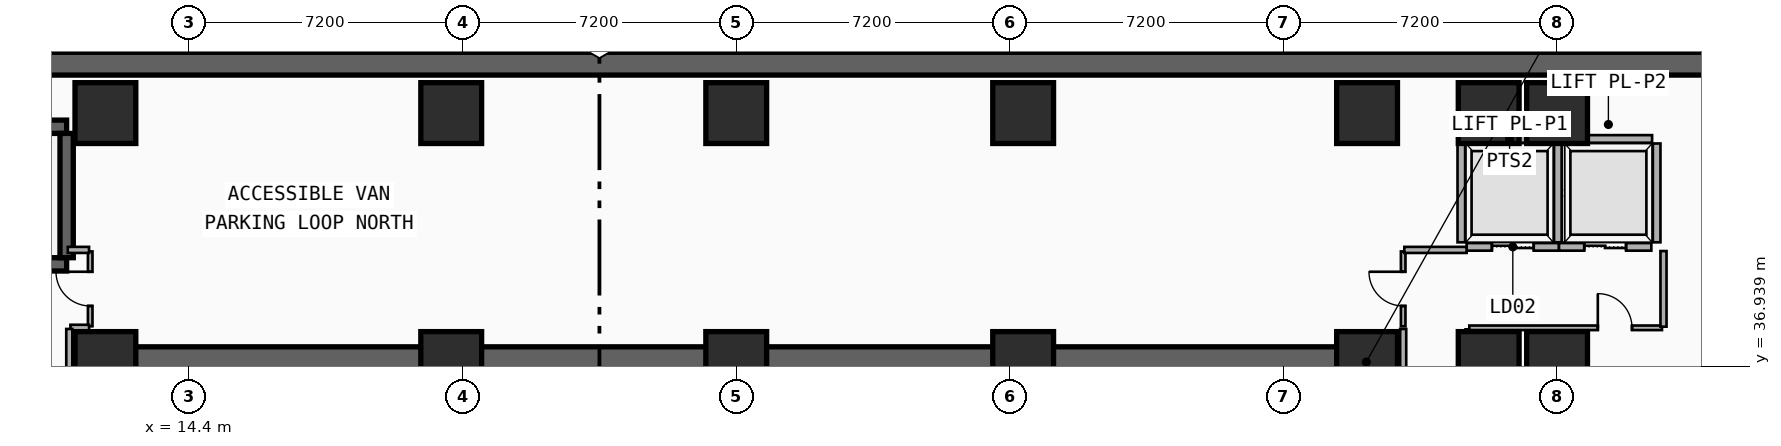
"""IFC4 building model, lengths in metres.
Left out: names, types, materials, properties, quantities, classifications, styles, units other than length and angle.
Written with IfcOpenShell. Run it as: python <this file> out.ifc"""

import sys

from ifc_helpers import new_model, si_unit, direction, frame, frame_2d, origin, origin_2d, place, context, subcontext, project, spatial, rectangle, extrude, element, fill, save


model = new_model("IFC4")
c1 = context("Model", 3, precision=1e-05, world=origin(), true_north=direction((0.0, 1.0)))
c2 = subcontext(c1, "Body", "Model", "MODEL_VIEW")
j1 = project(units=[si_unit("LENGTHUNIT", "METRE"), si_unit("PLANEANGLEUNIT", "RADIAN")], contexts=[c1])
p1 = place(None, origin())
s1 = spatial("IfcSite", under=j1, at=p1, CompositionType="ELEMENT")
p2 = place(p1, origin())
s2 = spatial("IfcBuilding", under=s1, at=p2, CompositionType="ELEMENT")
p3 = place(p2, frame((0.0, 0.0, -8.8)))
s3 = spatial("IfcBuildingStorey", under=s2, at=p3, CompositionType="ELEMENT", Elevation=-8.8)
p4 = place(p3, frame((0.3, 44.9, 0.0), z_axis=(0.0, 0.0, 1.0), x_axis=(1.0, 0.0, 0.0)))
e1 = element("IfcWall", 1, at=p4, inside=s3, PredefinedType="USERDEFINED", context=c2, shape_type="SweptSolid", body=[
    extrude(rectangle(XDim=57.0, YDim=0.6, at=frame_2d((28.5, 0.0))), origin(), (0.0, 0.0, 1.0), 4.4),
])
p5 = place(p3, frame((12.15, 37.05, 0.0), z_axis=(0.0, 0.0, 1.0), x_axis=(1.0, 0.0, 0.0)))
e2 = element("IfcWall", 2, at=p5, inside=s3, PredefinedType="SHEAR", context=c2, shape_type="SweptSolid", body=[
    extrude(rectangle(XDim=33.23, YDim=0.8, at=frame_2d((16.615, 0.0))), origin(), (0.0, 0.0, 1.0), 4.4),
])
p6 = place(p3, frame((1.62, 43.24, 0.0), z_axis=(0.0, 0.0, 1.0), x_axis=(1.0, 0.0, 0.0)))
e3 = element("IfcWall", 3, at=p6, inside=s3, PredefinedType="SHEAR", context=c2, shape_type="SweptSolid", body=[
    extrude(rectangle(XDim=9.56, YDim=0.35, at=frame_2d((4.78, 0.0))), origin(), (0.0, 0.0, 1.0), 4.4),
])
p7 = place(p3, frame((11.18, 39.62, 0.0), z_axis=(0.0, 0.0, 1.0), x_axis=(-1.0, 0.0, 0.0)))
e4 = element("IfcWall", 4, at=p7, inside=s3, PredefinedType="SHEAR", context=c2, shape_type="SweptSolid", body=[
    extrude(rectangle(XDim=9.56, YDim=0.35, at=frame_2d((4.78, 0.0))), origin(), (0.0, 0.0, 1.0), 4.4),
])
p8 = place(p7, frame((8.03, 0.0, 0.0)))
e5 = element("IfcOpeningElement", 5, at=p8, cuts=e4, PredefinedType="OPENING", context=c2, shape_type="SweptSolid", body=[
    extrude(rectangle(XDim=1.1, YDim=2.15, at=frame_2d((0.55, 1.075))), frame((0.0, 0.185, 0.0), z_axis=(0.0, -1.0, 0.0), x_axis=(1.0, 0.0, 0.0)), (0.0, 0.0, 1.0), 0.37),
])
p9 = place(p3, frame((11.18, 39.795, 0.0), z_axis=(0.0, 0.0, 1.0), x_axis=(0.0, 1.0, 0.0)))
e6 = element("IfcWall", 6, at=p9, inside=s3, PredefinedType="SHEAR", context=c2, shape_type="SweptSolid", body=[
    extrude(rectangle(XDim=3.27, YDim=0.35, at=frame_2d((1.635, 0.0))), origin(), (0.0, 0.0, 1.0), 4.4),
])
for number, where, z_axis, x_axis in (
    (7, (12.2, 37.05, 0.0), (0.0, 0.0, 1.0), (1.0, 0.0, 0.0)),
    (8, (21.3, 37.05, 0.0), (0.0, 0.0, 1.0), (1.0, 0.0, 0.0)),
    (9, (28.8, 37.05, 0.0), (0.0, 0.0, 1.0), (1.0, 0.0, 0.0)),
    (10, (36.35, 37.05, 0.0), (0.0, 0.0, 1.0), (1.0, 0.0, 0.0)),
    (11, (45.4, 37.05, 0.0), (0.0, 0.0, 1.0), (1.0, 0.0, 0.0)),
    (12, (12.2, 43.6, 0.0), (0.0, 0.0, 1.0), (1.0, 0.0, 0.0)),
    (13, (21.3, 43.6, 0.0), (0.0, 0.0, 1.0), (1.0, 0.0, 0.0)),
    (14, (28.8, 43.6, 0.0), (0.0, 0.0, 1.0), (1.0, 0.0, 0.0)),
    (15, (36.35, 43.6, 0.0), (0.0, 0.0, 1.0), (1.0, 0.0, 0.0)),
    (16, (45.4, 43.6, 0.0), (0.0, 0.0, 1.0), (1.0, 0.0, 0.0)),
    (17, (48.6, 37.05, 0.0), (0.0, 0.0, 1.0), (1.0, 0.0, 0.0)),
    (18, (48.6, 43.6, 0.0), (0.0, 0.0, 1.0), (1.0, 0.0, 0.0)),
    (19, (50.4, 37.05, 0.0), (0.0, 0.0, 1.0), (1.0, 0.0, 0.0)),
    (20, (50.4, 43.6, 0.0), (0.0, 0.0, 1.0), (1.0, 0.0, 0.0)),
):
    element("IfcColumn", number, at=place(p3, frame(where, z_axis=z_axis, x_axis=x_axis)), inside=s3, PredefinedType="COLUMN", context=c2, shape_type="SweptSolid", body=[
        extrude(rectangle(XDim=1.6, YDim=1.6, at=origin_2d()), origin(), (0.0, 0.0, 1.0), 4.4),
    ])
p10 = place(p3, frame((48.02, 40.08, 0.0), z_axis=(0.0, 0.0, 1.0), x_axis=(1.0, 0.0, 0.0)))
e21 = element("IfcWall", 21, at=p10, inside=s3, PredefinedType="PARTITIONING", context=c2, shape_type="SweptSolid", body=[
    extrude(rectangle(XDim=2.43, YDim=0.2, at=frame_2d((1.215, 0.0))), origin(), (0.0, 0.0, 1.0), 4.08),
])
p11 = place(p10, frame((0.665, 0.0, 0.0)))
e22 = element("IfcOpeningElement", 22, at=p11, cuts=e21, PredefinedType="OPENING", context=c2, shape_type="SweptSolid", body=[
    extrude(rectangle(XDim=1.1, YDim=2.15, at=frame_2d((0.55, 1.075))), frame((0.0, 0.11, 0.0), z_axis=(0.0, -1.0, 0.0), x_axis=(1.0, 0.0, 0.0)), (0.0, 0.0, 1.0), 0.22),
])
p12 = place(p3, frame((48.0, 42.92, 0.0), z_axis=(0.0, 0.0, 1.0), x_axis=(1.0, 0.0, 0.0)))
e23 = element("IfcWall", 23, at=p12, inside=s3, PredefinedType="PARTITIONING", context=c2, shape_type="SweptSolid", body=[
    extrude(rectangle(XDim=2.3, YDim=0.2, at=frame_2d((1.15, 0.0))), origin(), (0.0, 0.0, 1.0), 4.08),
])
for number, where, z_axis, x_axis in (
    (24, (47.88, 40.2, 0.0), (0.0, 0.0, 1.0), (0.0, 1.0, 0.0)),
    (25, (50.42, 40.2, 0.0), (0.0, 0.0, 1.0), (0.0, 1.0, 0.0)),
):
    element("IfcWall", number, at=place(p3, frame(where, z_axis=z_axis, x_axis=x_axis)), inside=s3, PredefinedType="PARTITIONING", context=c2, shape_type="SweptSolid", body=[
        extrude(rectangle(XDim=2.6, YDim=0.2, at=frame_2d((1.3, 0.0))), origin(), (0.0, 0.0, 1.0), 4.08),
    ])
p13 = place(p3, frame((50.45, 40.08, 0.0), z_axis=(0.0, 0.0, 1.0), x_axis=(1.0, 0.0, 0.0)))
e26 = element("IfcWall", 26, at=p13, inside=s3, PredefinedType="PARTITIONING", context=c2, shape_type="SweptSolid", body=[
    extrude(rectangle(XDim=2.43, YDim=0.2, at=frame_2d((1.215, 0.0))), origin(), (0.0, 0.0, 1.0), 4.08),
])
p14 = place(p13, frame((0.665, 0.0, 0.0)))
e27 = element("IfcOpeningElement", 27, at=p14, cuts=e26, PredefinedType="OPENING", context=c2, shape_type="SweptSolid", body=[
    extrude(rectangle(XDim=1.1, YDim=2.15, at=frame_2d((0.55, 1.075))), frame((0.0, 0.11, 0.0), z_axis=(0.0, -1.0, 0.0), x_axis=(1.0, 0.0, 0.0)), (0.0, 0.0, 1.0), 0.22),
])
p15 = place(p3, frame((50.6, 42.92, 0.0), z_axis=(0.0, 0.0, 1.0), x_axis=(1.0, 0.0, 0.0)))
e28 = element("IfcWall", 28, at=p15, inside=s3, PredefinedType="PARTITIONING", context=c2, shape_type="SweptSolid", body=[
    extrude(rectangle(XDim=2.3, YDim=0.2, at=frame_2d((1.15, 0.0))), origin(), (0.0, 0.0, 1.0), 4.08),
])
p16 = place(p3, frame((53.02, 40.2, 0.0), z_axis=(0.0, 0.0, 1.0), x_axis=(0.0, 1.0, 0.0)))
e29 = element("IfcWall", 29, at=p16, inside=s3, PredefinedType="PARTITIONING", context=c2, shape_type="SweptSolid", body=[
    extrude(rectangle(XDim=2.6, YDim=0.2, at=frame_2d((1.3, 0.0))), origin(), (0.0, 0.0, 1.0), 4.08),
])
p17 = place(p3, frame((48.05, 27.64, 0.0), z_axis=(0.0, 0.0, 1.0), x_axis=(0.0, 1.0, 0.0)))
e30 = element("IfcWall", 30, at=p17, inside=s3, PredefinedType="PARTITIONING", context=c2, shape_type="SweptSolid", body=[
    extrude(rectangle(XDim=10.27, YDim=0.12, at=frame_2d((5.135, 0.0))), origin(), (0.0, 0.0, 1.0), 4.08),
])
p18 = place(p17, frame((4.685, 0.0, 0.0)))
e31 = element("IfcOpeningElement", 31, at=p18, cuts=e30, PredefinedType="OPENING", context=c2, shape_type="SweptSolid", body=[
    extrude(rectangle(XDim=0.9, YDim=2.1, at=frame_2d((0.45, 1.05))), frame((0.0, 0.07, 0.0), z_axis=(0.0, -1.0, 0.0), x_axis=(1.0, 0.0, 0.0)), (0.0, 0.0, 1.0), 0.14),
])
p19 = place(p3, frame((46.35, 37.99, 0.0), z_axis=(0.0, 0.0, 1.0), x_axis=(0.0, 1.0, 0.0)))
e32 = element("IfcWall", 32, at=p19, inside=s3, PredefinedType="PARTITIONING", context=c2, shape_type="SweptSolid", body=[
    extrude(rectangle(XDim=1.97, YDim=0.12, at=frame_2d((0.985, 0.0))), origin(), (0.0, 0.0, 1.0), 4.08),
])
p20 = place(p19, frame((0.535, 0.0, 0.0)))
e33 = element("IfcOpeningElement", 33, at=p20, cuts=e32, PredefinedType="OPENING", context=c2, shape_type="SweptSolid", body=[
    extrude(rectangle(XDim=0.9, YDim=2.1, at=frame_2d((0.45, 1.05))), frame((0.0, 0.07, 0.0), z_axis=(0.0, -1.0, 0.0), x_axis=(1.0, 0.0, 0.0)), (0.0, 0.0, 1.0), 0.14),
])
p21 = place(p3, frame((48.09, 37.95, 0.0), z_axis=(0.0, 0.0, 1.0), x_axis=(1.0, 0.0, 0.0)))
e34 = element("IfcWall", 34, at=p21, inside=s3, PredefinedType="PARTITIONING", context=c2, shape_type="SweptSolid", body=[
    extrude(rectangle(XDim=5.07, YDim=0.12, at=frame_2d((2.535, 0.0))), origin(), (0.0, 0.0, 1.0), 4.08),
])
p22 = place(p21, frame((3.382, 0.0, 0.0)))
e35 = element("IfcOpeningElement", 35, at=p22, cuts=e34, PredefinedType="OPENING", context=c2, shape_type="SweptSolid", body=[
    extrude(rectangle(XDim=0.9, YDim=2.1, at=frame_2d((0.45, 1.05))), frame((0.0, 0.07, 0.0), z_axis=(0.0, -1.0, 0.0), x_axis=(1.0, 0.0, 0.0)), (0.0, 0.0, 1.0), 0.14),
])
p23 = place(p3, frame((11.8, 37.99, 0.0), z_axis=(0.0, 0.0, 1.0), x_axis=(0.0, 1.0, 0.0)))
e36 = element("IfcWall", 36, at=p23, inside=s3, PredefinedType="PARTITIONING", context=c2, shape_type="SweptSolid", body=[
    extrude(rectangle(XDim=1.97, YDim=0.12, at=frame_2d((0.985, 0.0))), origin(), (0.0, 0.0, 1.0), 3.41),
])
p24 = place(p23, frame((0.535, 0.0, 0.0)))
e37 = element("IfcOpeningElement", 37, at=p24, cuts=e36, PredefinedType="OPENING", context=c2, shape_type="SweptSolid", body=[
    extrude(rectangle(XDim=0.9, YDim=2.1, at=frame_2d((0.45, 1.05))), frame((0.0, 0.07, 0.0), z_axis=(0.0, -1.0, 0.0), x_axis=(1.0, 0.0, 0.0)), (0.0, 0.0, 1.0), 0.14),
])
p25 = place(p3, frame((46.38, 40.0, 0.0), z_axis=(0.0, 0.0, 1.0), x_axis=(1.0, 0.0, 0.0)))
e38 = element("IfcWall", 38, at=p25, inside=s3, PredefinedType="PARTITIONING", context=c2, shape_type="SweptSolid", body=[
    extrude(rectangle(XDim=1.64, YDim=0.16, at=frame_2d((0.82, 0.0))), origin(), (0.0, 0.0, 1.0), 4.08),
])
p26 = place(p3, frame((46.35, 27.63, 0.0), z_axis=(0.0, 0.0, 1.0), x_axis=(0.0, 1.0, 0.0)))
e39 = element("IfcWall", 39, at=p26, inside=s3, PredefinedType="PARTITIONING", context=c2, shape_type="SweptSolid", body=[
    extrude(rectangle(XDim=10.29, YDim=0.16, at=frame_2d((5.145, 0.0))), origin(), (0.0, 0.0, 1.0), 4.08),
])
p27 = place(p3, frame((53.2, 37.98, 0.0), z_axis=(0.0, 0.0, 1.0), x_axis=(0.0, 1.0, 0.0)))
e40 = element("IfcWall", 40, at=p27, inside=s3, PredefinedType="PARTITIONING", context=c2, shape_type="SweptSolid", body=[
    extrude(rectangle(XDim=1.99, YDim=0.16, at=frame_2d((0.995, 0.0))), origin(), (0.0, 0.0, 1.0), 4.08),
])
p28 = place(p3, frame((11.28, 37.95, 0.0), z_axis=(0.0, 0.0, 1.0), x_axis=(1.0, 0.0, 0.0)))
e41 = element("IfcWall", 41, at=p28, inside=s3, PredefinedType="PARTITIONING", context=c2, shape_type="SweptSolid", body=[
    extrude(rectangle(XDim=0.49, YDim=0.16, at=frame_2d((0.245, 0.0))), origin(), (0.0, 0.0, 1.0), 3.41),
])
p29 = place(p3, frame((11.21, 40.0, 0.0), z_axis=(0.0, 0.0, 1.0), x_axis=(1.0, 0.0, 0.0)))
e42 = element("IfcWall", 42, at=p29, inside=s3, PredefinedType="PARTITIONING", context=c2, shape_type="SweptSolid", body=[
    extrude(rectangle(XDim=0.56, YDim=0.16, at=frame_2d((0.28, 0.0))), origin(), (0.0, 0.0, 1.0), 3.41),
])
p30 = place(p3, frame((11.25, 27.63, 0.0), z_axis=(0.0, 0.0, 1.0), x_axis=(0.0, 1.0, 0.0)))
e43 = element("IfcWall", 43, at=p30, inside=s3, PredefinedType="PARTITIONING", context=c2, shape_type="SweptSolid", body=[
    extrude(rectangle(XDim=10.29, YDim=0.16, at=frame_2d((5.145, 0.0))), origin(), (0.0, 0.0, 1.0), 4.08),
])
p31 = place(p11, origin())
e44 = element("IfcDoor", 44, at=p31, inside=s3, OperationType="DOUBLE_DOOR_SLIDING", PredefinedType="DOOR", context=c2, shape_type="SweptSolid", body=[
    extrude(rectangle(XDim=1.1, YDim=2.15, at=frame_2d((0.55, 1.075))), frame((0.0, 0.025, 0.0), z_axis=(0.0, -1.0, 0.0), x_axis=(1.0, 0.0, 0.0)), (0.0, 0.0, 1.0), 0.05),
])
fill(e22, e44)
p32 = place(p14, origin())
e45 = element("IfcDoor", 45, at=p32, inside=s3, OperationType="DOUBLE_DOOR_SLIDING", PredefinedType="DOOR", context=c2, shape_type="SweptSolid", body=[
    extrude(rectangle(XDim=1.1, YDim=2.15, at=frame_2d((0.55, 1.075))), frame((0.0, 0.025, 0.0), z_axis=(0.0, -1.0, 0.0), x_axis=(1.0, 0.0, 0.0)), (0.0, 0.0, 1.0), 0.05),
])
fill(e27, e45)
p33 = place(p20, origin())
e46 = element("IfcDoor", 46, at=p33, inside=s3, OperationType="SINGLE_SWING_RIGHT", PredefinedType="DOOR", context=c2, shape_type="SweptSolid", body=[
    extrude(rectangle(XDim=0.9, YDim=2.1, at=frame_2d((0.45, 1.05))), frame((0.0, 0.025, 0.0), z_axis=(0.0, -1.0, 0.0), x_axis=(1.0, 0.0, 0.0)), (0.0, 0.0, 1.0), 0.05),
])
fill(e33, e46)
p34 = place(p22, origin())
e47 = element("IfcDoor", 47, at=p34, inside=s3, OperationType="SINGLE_SWING_LEFT", PredefinedType="DOOR", context=c2, shape_type="SweptSolid", body=[
    extrude(rectangle(XDim=0.9, YDim=2.1, at=frame_2d((0.45, 1.05))), frame((0.0, 0.025, 0.0), z_axis=(0.0, -1.0, 0.0), x_axis=(1.0, 0.0, 0.0)), (0.0, 0.0, 1.0), 0.05),
])
fill(e35, e47)
p35 = place(p24, origin())
e48 = element("IfcDoor", 48, at=p35, inside=s3, OperationType="SINGLE_SWING_RIGHT", PredefinedType="DOOR", context=c2, shape_type="SweptSolid", body=[
    extrude(rectangle(XDim=0.9, YDim=2.1, at=frame_2d((0.45, 1.05))), frame((0.0, 0.025, 0.0), z_axis=(0.0, -1.0, 0.0), x_axis=(1.0, 0.0, 0.0)), (0.0, 0.0, 1.0), 0.05),
])
fill(e37, e48)
save(model, sys.argv[1])
